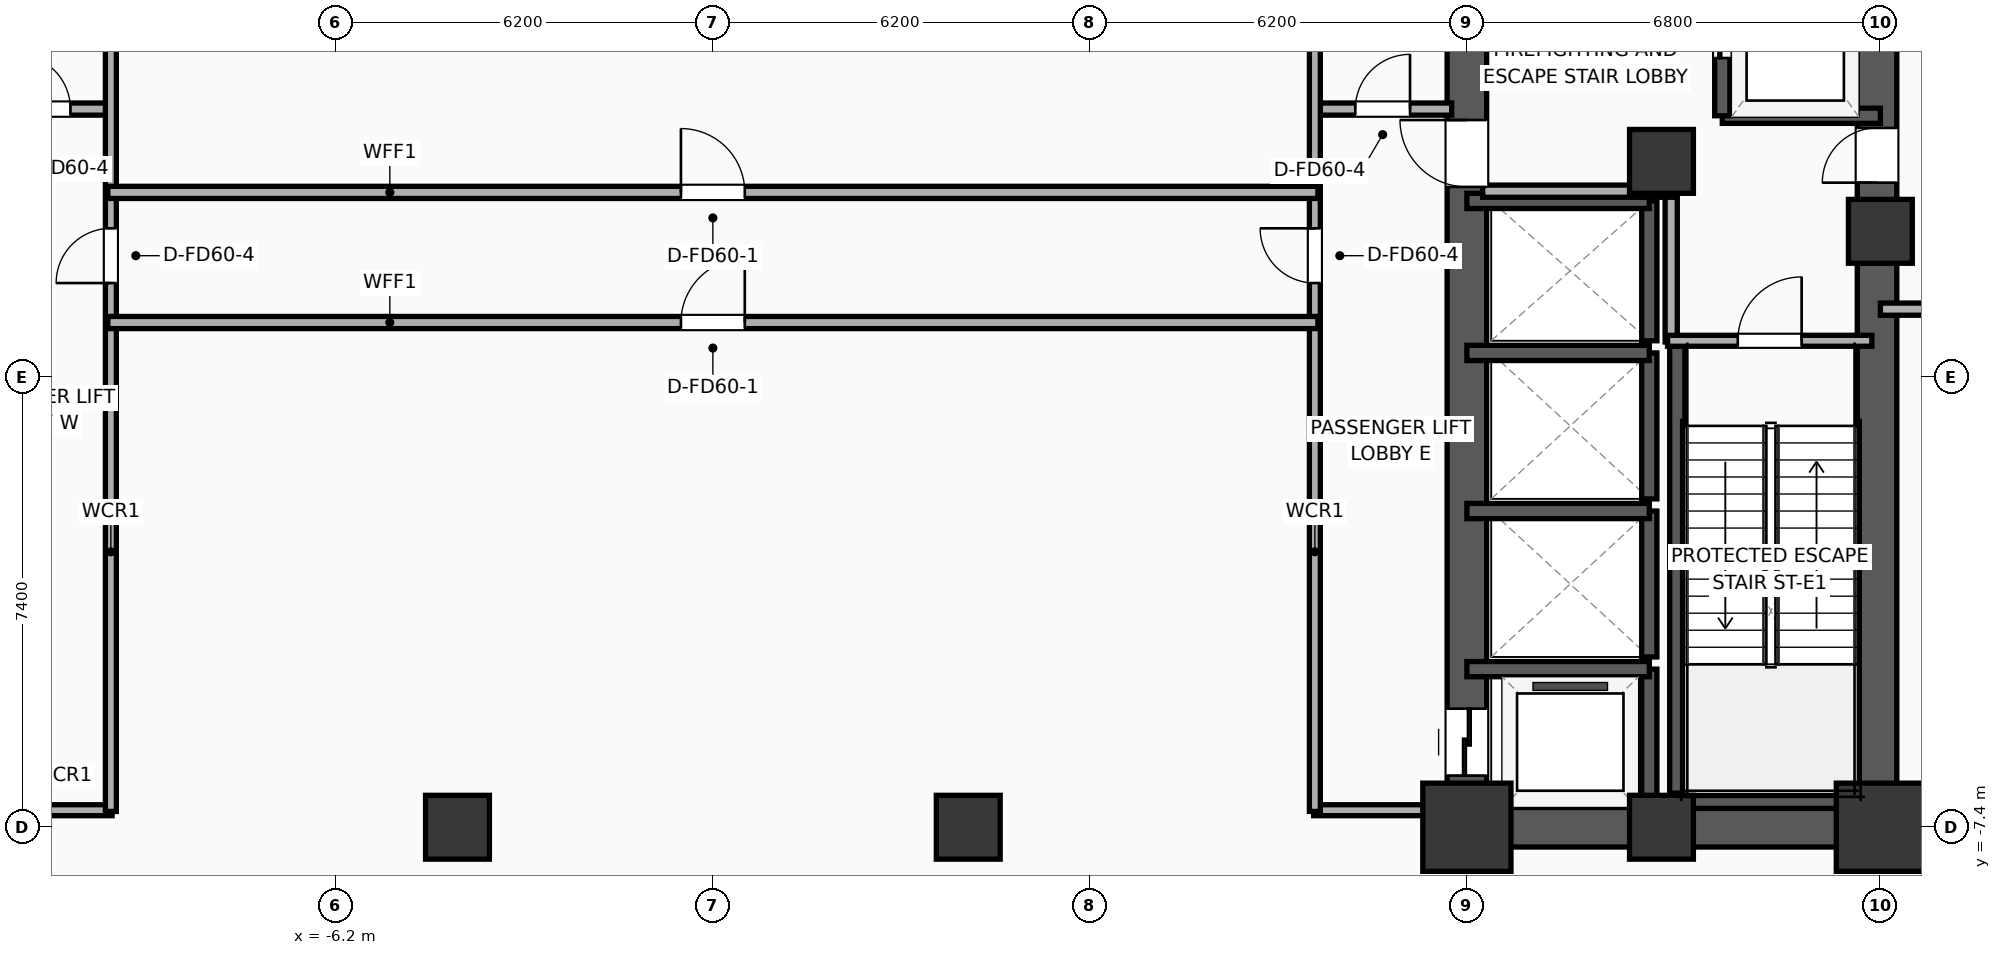
"""IFC4 building model, lengths in metres.
Left out: names, types, materials, properties, quantities, classifications, styles, units other than length and angle.
Written with IfcOpenShell. Run it as: python <this file> out.ifc"""

import sys

from ifc_helpers import new_model, si_unit, direction, frame, frame_2d, origin, origin_2d, place, context, subcontext, project, spatial, rectangle, extrude, element, fill, save


model = new_model("IFC4")
c1 = context("Model", 3, precision=1e-05, world=origin(), true_north=direction((0.0, 1.0)))
c2 = subcontext(c1, "Body", "Model", "MODEL_VIEW")
j1 = project(units=[si_unit("LENGTHUNIT", "METRE"), si_unit("PLANEANGLEUNIT", "RADIAN")], contexts=[c1])
p1 = place(None, origin())
s1 = spatial("IfcSite", under=j1, at=p1, CompositionType="ELEMENT")
p2 = place(p1, origin())
s2 = spatial("IfcBuilding", under=s1, at=p2, CompositionType="ELEMENT")
p3 = place(p2, frame((0.0, 0.0, 80.6)))
s3 = spatial("IfcBuildingStorey", under=s2, at=p3, CompositionType="ELEMENT", Elevation=80.6)
p4 = place(p3, frame((12.4, -7.4, 0.0), z_axis=(0.0, 0.0, 1.0), x_axis=(1.0, 0.0, 0.0)))
e1 = element("IfcColumn", 1, at=p4, inside=s3, PredefinedType="COLUMN", context=c2, shape_type="SweptSolid", body=[
    extrude(rectangle(XDim=1.45, YDim=1.45, at=origin_2d()), origin(), (0.0, 0.0, 1.0), 5.2),
])
for number, where, z_axis, x_axis in (
    (2, (15.6, 3.55, 0.0), (0.0, 0.0, 1.0), (1.0, 0.0, 0.0)),
    (3, (15.6, -7.4, 0.0), (0.0, 0.0, 1.0), (1.0, 0.0, 0.0)),
):
    element("IfcColumn", number, at=place(p3, frame(where, z_axis=z_axis, x_axis=x_axis)), inside=s3, PredefinedType="COLUMN", context=c2, shape_type="SweptSolid", body=[
        extrude(rectangle(XDim=1.05, YDim=1.05, at=origin_2d()), origin(), (0.0, 0.0, 1.0), 5.2),
    ])
p5 = place(p3, frame((19.2, -7.4, 0.0), z_axis=(0.0, 0.0, 1.0), x_axis=(1.0, 0.0, 0.0)))
e4 = element("IfcColumn", 4, at=p5, inside=s3, PredefinedType="COLUMN", context=c2, shape_type="SweptSolid", body=[
    extrude(rectangle(XDim=1.45, YDim=1.45, at=origin_2d()), origin(), (0.0, 0.0, 1.0), 5.2),
])
p6 = place(p3, frame((19.2, 2.4, 0.0), z_axis=(0.0, 0.0, 1.0), x_axis=(1.0, 0.0, 0.0)))
e5 = element("IfcColumn", 5, at=p6, inside=s3, PredefinedType="COLUMN", context=c2, shape_type="SweptSolid", body=[
    extrude(rectangle(XDim=1.05, YDim=1.05, at=origin_2d()), origin(), (0.0, 0.0, 1.0), 5.2),
])
p7 = place(p3, frame((12.075, -7.4, 0.0), z_axis=(0.0, 0.0, 1.0), x_axis=(1.0, 0.0, 0.0)))
e6 = element("IfcWall", 6, at=p7, inside=s3, PredefinedType="SHEAR", context=c2, shape_type="SweptSolid", body=[
    extrude(rectangle(XDim=7.45, YDim=0.65, at=frame_2d((3.725, 0.0))), origin(), (0.0, 0.0, 1.0), 4.8),
])
p8 = place(p3, frame((12.4, -7.4, 0.0), z_axis=(0.0, 0.0, 1.0), x_axis=(0.0, 1.0, 0.0)))
e7 = element("IfcWall", 7, at=p8, inside=s3, PredefinedType="SHEAR", context=c2, shape_type="SweptSolid", body=[
    extrude(rectangle(XDim=14.8, YDim=0.65, at=frame_2d((7.4, 0.0))), origin(), (0.0, 0.0, 1.0), 4.8),
])
p9 = place(p8, frame((0.85, 0.0, 0.0)))
e8 = element("IfcOpeningElement", 8, at=p9, cuts=e7, PredefinedType="OPENING", context=c2, shape_type="SweptSolid", body=[
    extrude(rectangle(XDim=1.1, YDim=2.05, at=frame_2d((0.55, 1.025))), frame((0.0, 0.335, 0.0), z_axis=(0.0, -1.0, 0.0), x_axis=(1.0, 0.0, 0.0)), (0.0, 0.0, 1.0), 0.67),
])
p10 = place(p8, frame((10.53, 0.0, 0.0)))
e9 = element("IfcOpeningElement", 9, at=p10, cuts=e7, PredefinedType="OPENING", context=c2, shape_type="SweptSolid", body=[
    extrude(rectangle(XDim=1.1, YDim=2.05, at=frame_2d((0.55, 1.025))), frame((0.0, 0.335, 0.0), z_axis=(0.0, -1.0, 0.0), x_axis=(1.0, 0.0, 0.0)), (0.0, 0.0, 1.0), 0.67),
])
p11 = place(p3, frame((19.145, -7.4, 0.0), z_axis=(0.0, 0.0, 1.0), x_axis=(0.0, 1.0, 0.0)))
e10 = element("IfcWall", 10, at=p11, inside=s3, PredefinedType="SHEAR", context=c2, shape_type="SweptSolid", body=[
    extrude(rectangle(XDim=14.8, YDim=0.65, at=frame_2d((7.4, 0.0))), origin(), (0.0, 0.0, 1.0), 4.8),
])
p12 = place(p11, frame((10.6, 0.0, 0.0)))
e11 = element("IfcOpeningElement", 11, at=p12, cuts=e10, PredefinedType="OPENING", context=c2, shape_type="SweptSolid", body=[
    extrude(rectangle(XDim=0.9, YDim=2.05, at=frame_2d((0.45, 1.025))), frame((0.0, 0.335, 0.0), z_axis=(0.0, -1.0, 0.0), x_axis=(1.0, 0.0, 0.0)), (0.0, 0.0, 1.0), 0.67),
])
p13 = place(p3, frame((15.86, -7.085, 0.0), z_axis=(0.0, 0.0, 1.0), x_axis=(0.0, 1.0, 0.0)))
e12 = element("IfcWall", 12, at=p13, inside=s3, PredefinedType="SOLIDWALL", context=c2, shape_type="SweptSolid", body=[
    extrude(rectangle(XDim=7.685, YDim=0.25, at=frame_2d((3.843, 0.0))), origin(), (0.0, 0.0, 1.0), 4.8),
])
p14 = place(p3, frame((15.74, -6.965, 0.0), z_axis=(0.0, 0.0, 1.0), x_axis=(1.0, 0.0, 0.0)))
e13 = element("IfcWall", 13, at=p14, inside=s3, PredefinedType="SOLIDWALL", context=c2, shape_type="SweptSolid", body=[
    extrude(rectangle(XDim=3.46, YDim=0.25, at=frame_2d((1.73, 0.0))), origin(), (0.0, 0.0, 1.0), 4.8),
])
for number, where, z_axis, x_axis in (
    (14, (-4.2, -7.4, 0.0), (0.0, 0.0, 1.0), (1.0, 0.0, 0.0)),
    (15, (4.2, -7.4, 0.0), (0.0, 0.0, 1.0), (1.0, 0.0, 0.0)),
):
    element("IfcColumn", number, at=place(p3, frame(where, z_axis=z_axis, x_axis=x_axis)), inside=s3, PredefinedType="COLUMN", context=c2, shape_type="SweptSolid", body=[
        extrude(rectangle(XDim=1.05, YDim=1.05, at=origin_2d()), origin(), (0.0, 0.0, 1.0), 5.2),
    ])
p15 = place(p3, frame((16.6, 4.3, 0.0), z_axis=(0.0, 0.0, 1.0), x_axis=(1.0, 0.0, 0.0)))
e16 = element("IfcWall", 16, at=p15, inside=s3, PredefinedType="SOLIDWALL", context=c2, shape_type="SweptSolid", body=[
    extrude(rectangle(XDim=2.6, YDim=0.25, at=frame_2d((1.3, 0.0))), origin(), (0.0, 0.0, 1.0), 4.8),
])
p16 = place(p3, frame((16.6, 7.4, 0.0), z_axis=(0.0, 0.0, 1.0), x_axis=(0.0, -1.0, 0.0)))
e17 = element("IfcWall", 17, at=p16, inside=s3, PredefinedType="SOLIDWALL", context=c2, shape_type="SweptSolid", body=[
    extrude(rectangle(XDim=3.1, YDim=0.25, at=frame_2d((1.55, 0.0))), origin(), (0.0, 0.0, 1.0), 4.8),
])
p17 = place(p16, frame((0.95, 0.0, 0.0)))
e18 = element("IfcOpeningElement", 18, at=p17, cuts=e17, PredefinedType="OPENING", context=c2, shape_type="SweptSolid", body=[
    extrude(rectangle(XDim=1.2, YDim=2.05, at=frame_2d((0.6, 1.025))), frame((0.0, 0.135, 0.0), z_axis=(0.0, -1.0, 0.0), x_axis=(1.0, 0.0, 0.0)), (0.0, 0.0, 1.0), 0.27),
])
p18 = place(p3, frame((15.4, -7.4, 0.0), z_axis=(0.0, 0.0, 1.0), x_axis=(0.0, 1.0, 0.0)))
e19 = element("IfcWall", 19, at=p18, inside=s3, PredefinedType="SOLIDWALL", context=c2, shape_type="SweptSolid", body=[
    extrude(rectangle(XDim=2.6, YDim=0.25, at=frame_2d((1.3, 0.0))), origin(), (0.0, 0.0, 1.0), 4.8),
])
p19 = place(p3, frame((15.4, -4.8, 0.0), z_axis=(0.0, 0.0, 1.0), x_axis=(-1.0, 0.0, 0.0)))
e20 = element("IfcWall", 20, at=p19, inside=s3, PredefinedType="SOLIDWALL", context=c2, shape_type="SweptSolid", body=[
    extrude(rectangle(XDim=3.0, YDim=0.25, at=frame_2d((1.5, 0.0))), origin(), (0.0, 0.0, 1.0), 4.8),
])
p20 = place(p3, frame((15.4, -4.6, 0.0), z_axis=(0.0, 0.0, 1.0), x_axis=(0.0, 1.0, 0.0)))
e21 = element("IfcWall", 21, at=p20, inside=s3, PredefinedType="SOLIDWALL", context=c2, shape_type="SweptSolid", body=[
    extrude(rectangle(XDim=2.4, YDim=0.25, at=frame_2d((1.2, 0.0))), origin(), (0.0, 0.0, 1.0), 4.8),
])
p21 = place(p3, frame((15.4, -2.2, 0.0), z_axis=(0.0, 0.0, 1.0), x_axis=(-1.0, 0.0, 0.0)))
e22 = element("IfcWall", 22, at=p21, inside=s3, PredefinedType="SOLIDWALL", context=c2, shape_type="SweptSolid", body=[
    extrude(rectangle(XDim=3.0, YDim=0.25, at=frame_2d((1.5, 0.0))), origin(), (0.0, 0.0, 1.0), 4.8),
])
p22 = place(p3, frame((15.4, -2.0, 0.0), z_axis=(0.0, 0.0, 1.0), x_axis=(0.0, 1.0, 0.0)))
e23 = element("IfcWall", 23, at=p22, inside=s3, PredefinedType="SOLIDWALL", context=c2, shape_type="SweptSolid", body=[
    extrude(rectangle(XDim=2.4, YDim=0.25, at=frame_2d((1.2, 0.0))), origin(), (0.0, 0.0, 1.0), 4.8),
])
p23 = place(p3, frame((15.4, 0.4, 0.0), z_axis=(0.0, 0.0, 1.0), x_axis=(-1.0, 0.0, 0.0)))
e24 = element("IfcWall", 24, at=p23, inside=s3, PredefinedType="SOLIDWALL", context=c2, shape_type="SweptSolid", body=[
    extrude(rectangle(XDim=3.0, YDim=0.25, at=frame_2d((1.5, 0.0))), origin(), (0.0, 0.0, 1.0), 4.8),
])
p24 = place(p3, frame((15.4, 0.6, 0.0), z_axis=(0.0, 0.0, 1.0), x_axis=(0.0, 1.0, 0.0)))
e25 = element("IfcWall", 25, at=p24, inside=s3, PredefinedType="SOLIDWALL", context=c2, shape_type="SweptSolid", body=[
    extrude(rectangle(XDim=2.3, YDim=0.25, at=frame_2d((1.15, 0.0))), origin(), (0.0, 0.0, 1.0), 4.8),
])
p25 = place(p3, frame((15.4, 2.9, 0.0), z_axis=(0.0, 0.0, 1.0), x_axis=(-1.0, 0.0, 0.0)))
e26 = element("IfcWall", 26, at=p25, inside=s3, PredefinedType="SOLIDWALL", context=c2, shape_type="SweptSolid", body=[
    extrude(rectangle(XDim=3.0, YDim=0.25, at=frame_2d((1.5, 0.0))), origin(), (0.0, 0.0, 1.0), 4.8),
])
p26 = place(p3, frame((-12.15, 4.41, 0.0), z_axis=(0.0, 0.0, 1.0), x_axis=(1.0, 0.0, 0.0)))
e27 = element("IfcWall", 27, at=p26, inside=s3, PredefinedType="PARTITIONING", context=c2, shape_type="SweptSolid", body=[
    extrude(rectangle(XDim=2.27, YDim=0.2, at=frame_2d((1.135, 0.0))), origin(), (0.0, 0.0, 1.0), 4.8),
])
p27 = place(p26, frame((0.685, 0.0, 0.0)))
e28 = element("IfcOpeningElement", 28, at=p27, cuts=e27, PredefinedType="OPENING", context=c2, shape_type="SweptSolid", body=[
    extrude(rectangle(XDim=0.9, YDim=2.05, at=frame_2d((0.45, 1.025))), frame((0.0, 0.11, 0.0), z_axis=(0.0, -1.0, 0.0), x_axis=(1.0, 0.0, 0.0)), (0.0, 0.0, 1.0), 0.22),
])
p28 = place(p3, frame((-12.15, -7.12, 0.0), z_axis=(0.0, 0.0, 1.0), x_axis=(1.0, 0.0, 0.0)))
e29 = element("IfcWall", 29, at=p28, inside=s3, PredefinedType="PARTITIONING", context=c2, shape_type="SweptSolid", body=[
    extrude(rectangle(XDim=2.27, YDim=0.18, at=frame_2d((1.135, 0.0))), origin(), (0.0, 0.0, 1.0), 3.84),
])
p29 = place(p3, frame((15.76, 0.58, 0.0), z_axis=(0.0, 0.0, 1.0), x_axis=(0.0, 1.0, 0.0)))
e30 = element("IfcWall", 30, at=p29, inside=s3, PredefinedType="PARTITIONING", context=c2, shape_type="SweptSolid", body=[
    extrude(rectangle(XDim=2.52, YDim=0.2, at=frame_2d((1.26, 0.0))), origin(), (0.0, 0.0, 1.0), 4.8),
])
p30 = place(p3, frame((12.66, 3.06, 0.0), z_axis=(0.0, 0.0, 1.0), x_axis=(1.0, 0.0, 0.0)))
e31 = element("IfcWall", 31, at=p30, inside=s3, PredefinedType="PARTITIONING", context=c2, shape_type="SweptSolid", body=[
    extrude(rectangle(XDim=3.16, YDim=0.2, at=frame_2d((1.58, 0.0))), origin(), (0.0, 0.0, 1.0), 4.8),
])
p31 = place(p3, frame((15.7, 0.6, 0.0), z_axis=(0.0, 0.0, 1.0), x_axis=(1.0, 0.0, 0.0)))
e32 = element("IfcWall", 32, at=p31, inside=s3, PredefinedType="PARTITIONING", context=c2, shape_type="SweptSolid", body=[
    extrude(rectangle(XDim=3.36, YDim=0.18, at=frame_2d((1.68, 0.0))), origin(), (0.0, 0.0, 1.0), 4.8),
])
p32 = place(p31, frame((1.155, 0.0, 0.0)))
e33 = element("IfcOpeningElement", 33, at=p32, cuts=e32, PredefinedType="OPENING", context=c2, shape_type="SweptSolid", body=[
    extrude(rectangle(XDim=1.05, YDim=2.05, at=frame_2d((0.525, 1.025))), frame((0.0, 0.1, 0.0), z_axis=(0.0, -1.0, 0.0), x_axis=(1.0, 0.0, 0.0)), (0.0, 0.0, 1.0), 0.2),
])
p33 = place(p3, frame((9.88, 4.41, 0.0), z_axis=(0.0, 0.0, 1.0), x_axis=(1.0, 0.0, 0.0)))
e34 = element("IfcWall", 34, at=p33, inside=s3, PredefinedType="PARTITIONING", context=c2, shape_type="SweptSolid", body=[
    extrude(rectangle(XDim=2.27, YDim=0.2, at=frame_2d((1.135, 0.0))), origin(), (0.0, 0.0, 1.0), 4.8),
])
p34 = place(p33, frame((0.685, 0.0, 0.0)))
e35 = element("IfcOpeningElement", 35, at=p34, cuts=e34, PredefinedType="OPENING", context=c2, shape_type="SweptSolid", body=[
    extrude(rectangle(XDim=0.9, YDim=2.05, at=frame_2d((0.45, 1.025))), frame((0.0, 0.11, 0.0), z_axis=(0.0, -1.0, 0.0), x_axis=(1.0, 0.0, 0.0)), (0.0, 0.0, 1.0), 0.22),
])
p35 = place(p3, frame((9.88, -7.12, 0.0), z_axis=(0.0, 0.0, 1.0), x_axis=(1.0, 0.0, 0.0)))
e36 = element("IfcWall", 36, at=p35, inside=s3, PredefinedType="PARTITIONING", context=c2, shape_type="SweptSolid", body=[
    extrude(rectangle(XDim=2.27, YDim=0.18, at=frame_2d((1.135, 0.0))), origin(), (0.0, 0.0, 1.0), 3.84),
])
p36 = place(p3, frame((-9.9, -7.14, 0.0), z_axis=(0.0, 0.0, 1.0), x_axis=(0.0, 1.0, 0.0)))
e37 = element("IfcWall", 37, at=p36, inside=s3, PredefinedType="PARTITIONING", context=c2, shape_type="SweptSolid", body=[
    extrude(rectangle(XDim=14.28, YDim=0.18, at=frame_2d((7.14, 0.0))), origin(), (0.0, 0.0, 1.0), 4.8),
])
p37 = place(p36, frame((8.689, 0.0, 0.0)))
e38 = element("IfcOpeningElement", 38, at=p37, cuts=e37, PredefinedType="OPENING", context=c2, shape_type="SweptSolid", body=[
    extrude(rectangle(XDim=0.9, YDim=2.05, at=frame_2d((0.45, 1.025))), frame((0.0, 0.1, 0.0), z_axis=(0.0, -1.0, 0.0), x_axis=(1.0, 0.0, 0.0)), (0.0, 0.0, 1.0), 0.2),
])
p38 = place(p3, frame((9.9, -7.14, 0.0), z_axis=(0.0, 0.0, 1.0), x_axis=(0.0, 1.0, 0.0)))
e39 = element("IfcWall", 39, at=p38, inside=s3, PredefinedType="PARTITIONING", context=c2, shape_type="SweptSolid", body=[
    extrude(rectangle(XDim=14.28, YDim=0.18, at=frame_2d((7.14, 0.0))), origin(), (0.0, 0.0, 1.0), 4.8),
])
p39 = place(p38, frame((8.689, 0.0, 0.0)))
e40 = element("IfcOpeningElement", 40, at=p39, cuts=e39, PredefinedType="OPENING", context=c2, shape_type="SweptSolid", body=[
    extrude(rectangle(XDim=0.9, YDim=2.05, at=frame_2d((0.45, 1.025))), frame((0.0, 0.1, 0.0), z_axis=(0.0, -1.0, 0.0), x_axis=(1.0, 0.0, 0.0)), (0.0, 0.0, 1.0), 0.2),
])
p40 = place(p3, frame((-9.95, 3.04, 0.0), z_axis=(0.0, 0.0, 1.0), x_axis=(1.0, 0.0, 0.0)))
e41 = element("IfcWall", 41, at=p40, inside=s3, PredefinedType="PARTITIONING", context=c2, shape_type="SweptSolid", body=[
    extrude(rectangle(XDim=19.9, YDim=0.2, at=frame_2d((9.95, 0.0))), origin(), (0.0, 0.0, 1.0), 4.8),
])
p41 = place(p40, frame((9.425, 0.0, 0.0)))
e42 = element("IfcOpeningElement", 42, at=p41, cuts=e41, PredefinedType="OPENING", context=c2, shape_type="SweptSolid", body=[
    extrude(rectangle(XDim=1.05, YDim=2.05, at=frame_2d((0.525, 1.025))), frame((0.0, 0.11, 0.0), z_axis=(0.0, -1.0, 0.0), x_axis=(1.0, 0.0, 0.0)), (0.0, 0.0, 1.0), 0.22),
])
p42 = place(p3, frame((-9.95, 0.9, 0.0), z_axis=(0.0, 0.0, 1.0), x_axis=(1.0, 0.0, 0.0)))
e43 = element("IfcWall", 43, at=p42, inside=s3, PredefinedType="PARTITIONING", context=c2, shape_type="SweptSolid", body=[
    extrude(rectangle(XDim=19.9, YDim=0.2, at=frame_2d((9.95, 0.0))), origin(), (0.0, 0.0, 1.0), 4.8),
])
p43 = place(p42, frame((9.425, 0.0, 0.0)))
e44 = element("IfcOpeningElement", 44, at=p43, cuts=e43, PredefinedType="OPENING", context=c2, shape_type="SweptSolid", body=[
    extrude(rectangle(XDim=1.05, YDim=2.05, at=frame_2d((0.525, 1.025))), frame((0.0, 0.11, 0.0), z_axis=(0.0, -1.0, 0.0), x_axis=(1.0, 0.0, 0.0)), (0.0, 0.0, 1.0), 0.22),
])
p44 = place(p3, frame((19.2, 1.12, 0.0), z_axis=(0.0, 0.0, 1.0), x_axis=(1.0, 0.0, 0.0)))
e45 = element("IfcWall", 45, at=p44, inside=s3, PredefinedType="PARTITIONING", context=c2, shape_type="SweptSolid", body=[
    extrude(rectangle(XDim=7.01, YDim=0.2, at=frame_2d((3.505, 0.0))), origin(), (0.0, 0.0, 1.0), 4.8),
])
p45 = place(p17, origin())
e46 = element("IfcDoor", 46, at=p45, inside=s3, OperationType="SLIDING_TO_LEFT", PredefinedType="DOOR", context=c2, shape_type="SweptSolid", body=[
    extrude(rectangle(XDim=1.2, YDim=2.05, at=frame_2d((0.6, 1.025))), frame((0.0, 0.025, 0.0), z_axis=(0.0, -1.0, 0.0), x_axis=(1.0, 0.0, 0.0)), (0.0, 0.0, 1.0), 0.05),
])
fill(e18, e46)
p46 = place(p9, origin())
e47 = element("IfcDoor", 47, at=p46, inside=s3, OperationType="SLIDING_TO_LEFT", PredefinedType="DOOR", context=c2, shape_type="SweptSolid", body=[
    extrude(rectangle(XDim=1.1, YDim=2.05, at=frame_2d((0.55, 1.025))), frame((0.0, 0.025, 0.0), z_axis=(0.0, -1.0, 0.0), x_axis=(1.0, 0.0, 0.0)), (0.0, 0.0, 1.0), 0.05),
])
fill(e8, e47)
p47 = place(p27, origin())
e48 = element("IfcDoor", 48, at=p47, inside=s3, OperationType="SINGLE_SWING_LEFT", PredefinedType="DOOR", context=c2, shape_type="SweptSolid", body=[
    extrude(rectangle(XDim=0.9, YDim=2.05, at=frame_2d((0.45, 1.025))), frame((0.0, 0.025, 0.0), z_axis=(0.0, -1.0, 0.0), x_axis=(1.0, 0.0, 0.0)), (0.0, 0.0, 1.0), 0.05),
])
fill(e28, e48)
p48 = place(p32, origin())
e49 = element("IfcDoor", 49, at=p48, inside=s3, OperationType="SINGLE_SWING_RIGHT", PredefinedType="DOOR", context=c2, shape_type="SweptSolid", body=[
    extrude(rectangle(XDim=1.05, YDim=2.05, at=frame_2d((0.525, 1.025))), frame((0.0, 0.025, 0.0), z_axis=(0.0, -1.0, 0.0), x_axis=(1.0, 0.0, 0.0)), (0.0, 0.0, 1.0), 0.05),
])
fill(e33, e49)
p49 = place(p34, origin())
e50 = element("IfcDoor", 50, at=p49, inside=s3, OperationType="SINGLE_SWING_RIGHT", PredefinedType="DOOR", context=c2, shape_type="SweptSolid", body=[
    extrude(rectangle(XDim=0.9, YDim=2.05, at=frame_2d((0.45, 1.025))), frame((0.0, 0.025, 0.0), z_axis=(0.0, -1.0, 0.0), x_axis=(1.0, 0.0, 0.0)), (0.0, 0.0, 1.0), 0.05),
])
fill(e35, e50)
p50 = place(p37, origin())
e51 = element("IfcDoor", 51, at=p50, inside=s3, OperationType="SINGLE_SWING_LEFT", PredefinedType="DOOR", context=c2, shape_type="SweptSolid", body=[
    extrude(rectangle(XDim=0.9, YDim=2.05, at=frame_2d((0.45, 1.025))), frame((0.0, 0.025, 0.0), z_axis=(0.0, -1.0, 0.0), x_axis=(1.0, 0.0, 0.0)), (0.0, 0.0, 1.0), 0.05),
])
fill(e38, e51)
p51 = place(p39, origin())
e52 = element("IfcDoor", 52, at=p51, inside=s3, OperationType="SINGLE_SWING_RIGHT", PredefinedType="DOOR", context=c2, shape_type="SweptSolid", body=[
    extrude(rectangle(XDim=0.9, YDim=2.05, at=frame_2d((0.45, 1.025))), frame((0.0, 0.025, 0.0), z_axis=(0.0, -1.0, 0.0), x_axis=(1.0, 0.0, 0.0)), (0.0, 0.0, 1.0), 0.05),
])
fill(e40, e52)
p52 = place(p41, origin())
e53 = element("IfcDoor", 53, at=p52, inside=s3, OperationType="SINGLE_SWING_LEFT", PredefinedType="DOOR", context=c2, shape_type="SweptSolid", body=[
    extrude(rectangle(XDim=1.05, YDim=2.05, at=frame_2d((0.525, 1.025))), frame((0.0, 0.025, 0.0), z_axis=(0.0, -1.0, 0.0), x_axis=(1.0, 0.0, 0.0)), (0.0, 0.0, 1.0), 0.05),
])
fill(e42, e53)
p53 = place(p43, origin())
e54 = element("IfcDoor", 54, at=p53, inside=s3, OperationType="SINGLE_SWING_RIGHT", PredefinedType="DOOR", context=c2, shape_type="SweptSolid", body=[
    extrude(rectangle(XDim=1.05, YDim=2.05, at=frame_2d((0.525, 1.025))), frame((0.0, 0.025, 0.0), z_axis=(0.0, -1.0, 0.0), x_axis=(1.0, 0.0, 0.0)), (0.0, 0.0, 1.0), 0.05),
])
fill(e44, e54)
p54 = place(p10, origin())
e55 = element("IfcDoor", 55, at=p54, inside=s3, OperationType="SINGLE_SWING_RIGHT", PredefinedType="DOOR", context=c2, shape_type="SweptSolid", body=[
    extrude(rectangle(XDim=1.1, YDim=2.05, at=frame_2d((0.55, 1.025))), frame((0.0, 0.025, 0.0), z_axis=(0.0, -1.0, 0.0), x_axis=(1.0, 0.0, 0.0)), (0.0, 0.0, 1.0), 0.05),
])
fill(e9, e55)
p55 = place(p12, origin())
e56 = element("IfcDoor", 56, at=p55, inside=s3, OperationType="SINGLE_SWING_LEFT", PredefinedType="DOOR", context=c2, shape_type="SweptSolid", body=[
    extrude(rectangle(XDim=0.9, YDim=2.05, at=frame_2d((0.45, 1.025))), frame((0.0, 0.025, 0.0), z_axis=(0.0, -1.0, 0.0), x_axis=(1.0, 0.0, 0.0)), (0.0, 0.0, 1.0), 0.05),
])
fill(e11, e56)
save(model, sys.argv[1])
